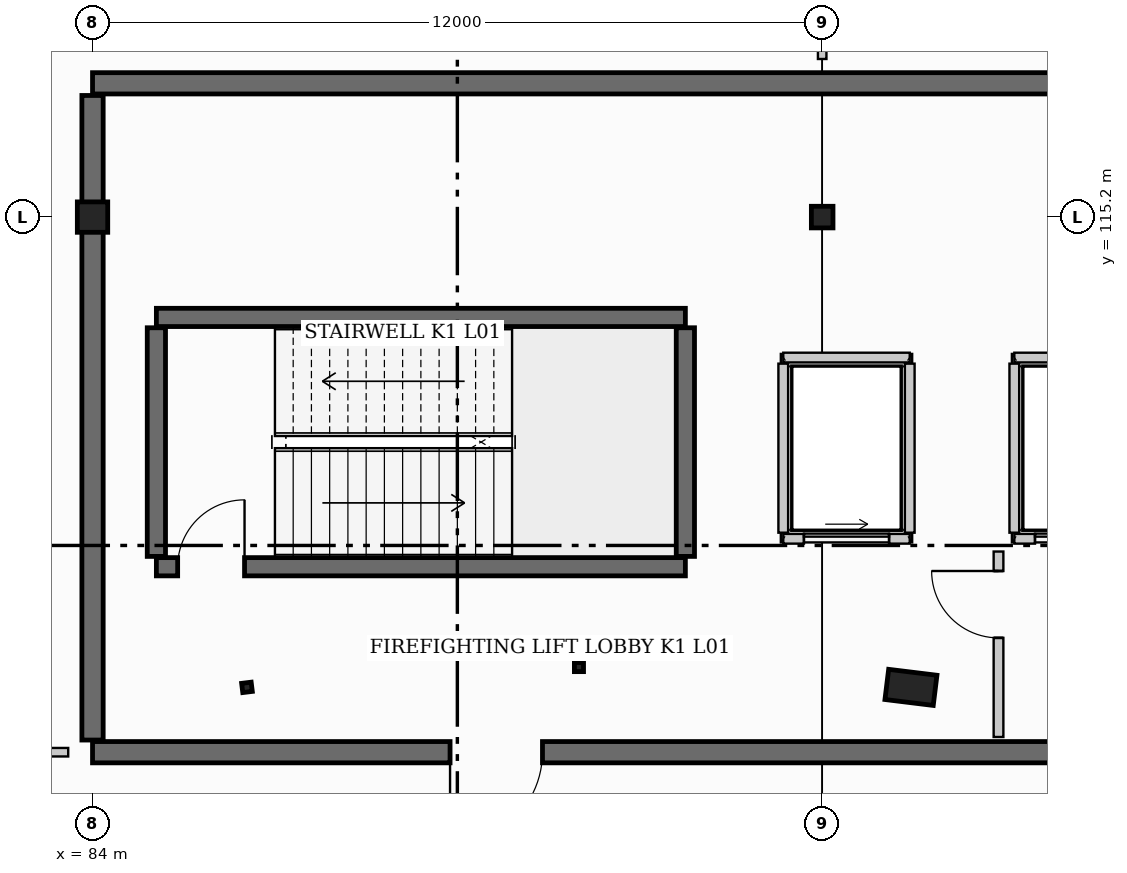
"""IFC4 building model, lengths in metres.
Left out: names, types, materials, properties, quantities, classifications, styles, units other than length and angle.
Written with IfcOpenShell. Run it as: python <this file> out.ifc"""

import sys

from ifc_helpers import new_model, si_unit, direction, frame, frame_2d, origin, origin_2d, place, context, subcontext, project, spatial, rectangle, hollow_rectangle, hollow_circle, i_section, extrude, element, fill, save


model = new_model("IFC4")
c1 = context("Model", 3, precision=1e-05, world=origin(), true_north=direction((0.0, 1.0)))
c2 = subcontext(c1, "Body", "Model", "MODEL_VIEW")
j1 = project(units=[si_unit("LENGTHUNIT", "METRE"), si_unit("PLANEANGLEUNIT", "RADIAN")], contexts=[c1])
p1 = place(None, origin())
s1 = spatial("IfcSite", under=j1, at=p1, CompositionType="ELEMENT")
p2 = place(p1, origin())
s2 = spatial("IfcBuilding", under=s1, at=p2, CompositionType="ELEMENT")
p3 = place(p2, frame((0.0, 0.0, 4.8)))
s3 = spatial("IfcBuildingStorey", under=s2, at=p3, CompositionType="ELEMENT", Elevation=4.8)
p4 = place(p3, frame((84.0, 115.2, 0.0), z_axis=(0.0, 0.0, 1.0), x_axis=(0.0, 1.0, 0.0)))
e1 = element("IfcColumn", 1, at=p4, inside=s3, PredefinedType="COLUMN", context=c2, shape_type="SweptSolid", body=[
    extrude(i_section(OverallWidth=0.5, OverallDepth=0.5, WebThickness=0.022, FlangeThickness=0.036, at=origin_2d()), origin(), (0.0, 0.0, 1.0), 4.8),
])
p5 = place(p3, frame((96.0, 115.2, 0.0), z_axis=(0.0, 0.0, 1.0), x_axis=(1.0, 0.0, 0.0)))
e2 = element("IfcColumn", 2, at=p5, inside=s3, PredefinedType="COLUMN", context=c2, shape_type="SweptSolid", body=[
    extrude(hollow_circle(Radius=0.178, WallThickness=0.013, at=origin_2d()), origin(), (0.0, 0.0, 1.0), 4.8),
])
p6 = place(p3, frame((86.54, 107.466, 0.0), z_axis=(0.0, 0.0, 1.0), x_axis=(-0.121869343405, 0.992546151641, 0.0)))
e3 = element("IfcColumn", 3, at=p6, inside=s3, PredefinedType="COLUMN", context=c2, shape_type="SweptSolid", body=[
    extrude(i_section(OverallWidth=0.153, OverallDepth=0.158, WebThickness=0.007, FlangeThickness=0.01, at=origin_2d()), origin(), (0.0, 0.0, 1.0), 4.8),
])
p7 = place(p3, frame((92.0, 107.8, 0.0), z_axis=(0.0, 0.0, 1.0), x_axis=(0.0, 1.0, 0.0)))
e4 = element("IfcColumn", 4, at=p7, inside=s3, PredefinedType="COLUMN", context=c2, shape_type="SweptSolid", body=[
    extrude(hollow_rectangle(XDim=0.15, YDim=0.15, WallThickness=0.008, at=origin_2d()), origin(), (0.0, 0.0, 1.0), 4.8),
])
p8 = place(p3, frame((97.46, 107.466, 0.0), z_axis=(0.0, 0.0, 1.0), x_axis=(0.121869343405, 0.992546151641, 0.0)))
e5 = element("IfcColumn", 5, at=p8, inside=s3, PredefinedType="PILASTER", context=c2, shape_type="SweptSolid", body=[
    extrude(rectangle(XDim=0.5, YDim=0.8, at=origin_2d()), origin(), (0.0, 0.0, 1.0), 4.8),
])
p9 = place(p3, frame((84.0, 117.4, 0.0), z_axis=(0.0, 0.0, 1.0), x_axis=(1.0, 0.0, 0.0)))
e6 = element("IfcWall", 6, at=p9, inside=s3, PredefinedType="SHEAR", context=c2, shape_type="SweptSolid", body=[
    extrude(rectangle(XDim=20.4, YDim=0.35, at=frame_2d((10.2, 0.0))), origin(), (0.0, 0.0, 1.0), 4.8),
])
p10 = place(p3, frame((104.4, 106.4, 0.0), z_axis=(0.0, 0.0, 1.0), x_axis=(-1.0, 0.0, 0.0)))
e7 = element("IfcWall", 7, at=p10, inside=s3, PredefinedType="SHEAR", context=c2, shape_type="SweptSolid", body=[
    extrude(rectangle(XDim=20.4, YDim=0.35, at=frame_2d((10.2, 0.0))), origin(), (0.0, 0.0, 1.0), 4.8),
])
p11 = place(p10, frame((2.2, 0.0, 0.0)))
e8 = element("IfcOpeningElement", 8, at=p11, cuts=e7, PredefinedType="OPENING", context=c2, shape_type="SweptSolid", body=[
    extrude(rectangle(XDim=1.64, YDim=2.2, at=frame_2d((0.82, 1.1))), frame((0.0, 0.185, 0.0), z_axis=(0.0, -1.0, 0.0), x_axis=(1.0, 0.0, 0.0)), (0.0, 0.0, 1.0), 0.37),
])
p12 = place(p10, frame((13.0, 0.0, 0.0)))
e9 = element("IfcOpeningElement", 9, at=p12, cuts=e7, PredefinedType="OPENING", context=c2, shape_type="SweptSolid", body=[
    extrude(rectangle(XDim=1.52, YDim=2.16, at=frame_2d((0.76, 1.08))), frame((0.0, 0.185, 0.0), z_axis=(0.0, -1.0, 0.0), x_axis=(1.0, 0.0, 0.0)), (0.0, 0.0, 1.0), 0.37),
])
p13 = place(p3, frame((84.0, 106.6, 0.0), z_axis=(0.0, 0.0, 1.0), x_axis=(0.0, 1.0, 0.0)))
e10 = element("IfcWall", 10, at=p13, inside=s3, PredefinedType="SHEAR", context=c2, shape_type="SweptSolid", body=[
    extrude(rectangle(XDim=10.6, YDim=0.35, at=frame_2d((5.3, 0.0))), origin(), (0.0, 0.0, 1.0), 4.8),
])
p14 = place(p3, frame((85.05, 109.45, 0.0), z_axis=(0.0, 0.0, 1.0), x_axis=(1.0, 0.0, 0.0)))
e11 = element("IfcWall", 11, at=p14, inside=s3, PredefinedType="SHEAR", context=c2, shape_type="SweptSolid", body=[
    extrude(rectangle(XDim=8.7, YDim=0.3, at=frame_2d((4.35, 0.0))), origin(), (0.0, 0.0, 1.0), 4.8),
])
p15 = place(p14, frame((0.35, 0.0, 0.0)))
e12 = element("IfcOpeningElement", 12, at=p15, cuts=e11, PredefinedType="OPENING", context=c2, shape_type="SweptSolid", body=[
    extrude(rectangle(XDim=1.1, YDim=2.15, at=frame_2d((0.55, 1.075))), frame((0.0, 0.16, 0.0), z_axis=(0.0, -1.0, 0.0), x_axis=(1.0, 0.0, 0.0)), (0.0, 0.0, 1.0), 0.32),
])
p16 = place(p3, frame((93.75, 113.55, 0.0), z_axis=(0.0, 0.0, 1.0), x_axis=(-1.0, 0.0, 0.0)))
e13 = element("IfcWall", 13, at=p16, inside=s3, PredefinedType="SHEAR", context=c2, shape_type="SweptSolid", body=[
    extrude(rectangle(XDim=8.7, YDim=0.3, at=frame_2d((4.35, 0.0))), origin(), (0.0, 0.0, 1.0), 4.8),
])
for number, where, z_axis, x_axis in (
    (14, (85.05, 109.62, 0.0), (0.0, 0.0, 1.0), (0.0, 1.0, 0.0)),
    (15, (93.75, 109.62, 0.0), (0.0, 0.0, 1.0), (0.0, 1.0, 0.0)),
):
    element("IfcWall", number, at=place(p3, frame(where, z_axis=z_axis, x_axis=x_axis)), inside=s3, PredefinedType="SHEAR", context=c2, shape_type="SweptSolid", body=[
        extrude(rectangle(XDim=3.76, YDim=0.3, at=frame_2d((1.88, 0.0))), origin(), (0.0, 0.0, 1.0), 4.8),
    ])
p17 = place(p3, frame((95.36, 109.91, 0.0), z_axis=(0.0, 0.0, 1.0), x_axis=(1.0, 0.0, 0.0)))
e16 = element("IfcWall", 16, at=p17, inside=s3, PredefinedType="PARTITIONING", context=c2, shape_type="SweptSolid", body=[
    extrude(rectangle(XDim=2.08, YDim=0.16, at=frame_2d((1.04, 0.0))), origin(), (0.0, 0.0, 1.0), 4.43),
])
p18 = place(p17, frame((0.34, 0.0, 0.0)))
e17 = element("IfcOpeningElement", 17, at=p18, cuts=e16, PredefinedType="OPENING", context=c2, shape_type="SweptSolid", body=[
    extrude(rectangle(XDim=1.4, YDim=2.2, at=frame_2d((0.7, 1.1))), frame((0.0, 0.09, 0.0), z_axis=(0.0, -1.0, 0.0), x_axis=(1.0, 0.0, 0.0)), (0.0, 0.0, 1.0), 0.18),
])
p19 = place(p3, frame((97.44, 112.89, 0.0), z_axis=(0.0, 0.0, 1.0), x_axis=(-1.0, 0.0, 0.0)))
e18 = element("IfcWall", 18, at=p19, inside=s3, PredefinedType="PARTITIONING", context=c2, shape_type="SweptSolid", body=[
    extrude(rectangle(XDim=2.08, YDim=0.16, at=frame_2d((1.04, 0.0))), origin(), (0.0, 0.0, 1.0), 4.43),
])
for number, where, z_axis, x_axis in (
    (19, (95.36, 112.79, 0.0), (0.0, 0.0, 1.0), (0.0, -1.0, 0.0)),
    (20, (97.44, 110.01, 0.0), (0.0, 0.0, 1.0), (0.0, 1.0, 0.0)),
):
    element("IfcWall", number, at=place(p3, frame(where, z_axis=z_axis, x_axis=x_axis)), inside=s3, PredefinedType="PARTITIONING", context=c2, shape_type="SweptSolid", body=[
        extrude(rectangle(XDim=2.78, YDim=0.16, at=frame_2d((1.39, 0.0))), origin(), (0.0, 0.0, 1.0), 4.43),
    ])
p20 = place(p3, frame((99.16, 109.91, 0.0), z_axis=(0.0, 0.0, 1.0), x_axis=(1.0, 0.0, 0.0)))
e21 = element("IfcWall", 21, at=p20, inside=s3, PredefinedType="PARTITIONING", context=c2, shape_type="SweptSolid", body=[
    extrude(rectangle(XDim=2.08, YDim=0.16, at=frame_2d((1.04, 0.0))), origin(), (0.0, 0.0, 1.0), 4.43),
])
p21 = place(p20, frame((0.34, 0.0, 0.0)))
e22 = element("IfcOpeningElement", 22, at=p21, cuts=e21, PredefinedType="OPENING", context=c2, shape_type="SweptSolid", body=[
    extrude(rectangle(XDim=1.4, YDim=2.2, at=frame_2d((0.7, 1.1))), frame((0.0, 0.09, 0.0), z_axis=(0.0, -1.0, 0.0), x_axis=(1.0, 0.0, 0.0)), (0.0, 0.0, 1.0), 0.18),
])
p22 = place(p3, frame((101.24, 112.89, 0.0), z_axis=(0.0, 0.0, 1.0), x_axis=(-1.0, 0.0, 0.0)))
e23 = element("IfcWall", 23, at=p22, inside=s3, PredefinedType="PARTITIONING", context=c2, shape_type="SweptSolid", body=[
    extrude(rectangle(XDim=2.08, YDim=0.16, at=frame_2d((1.04, 0.0))), origin(), (0.0, 0.0, 1.0), 4.43),
])
p23 = place(p3, frame((99.16, 112.79, 0.0), z_axis=(0.0, 0.0, 1.0), x_axis=(0.0, -1.0, 0.0)))
e24 = element("IfcWall", 24, at=p23, inside=s3, PredefinedType="PARTITIONING", context=c2, shape_type="SweptSolid", body=[
    extrude(rectangle(XDim=2.78, YDim=0.16, at=frame_2d((1.39, 0.0))), origin(), (0.0, 0.0, 1.0), 4.43),
])
p24 = place(p3, frame((98.9, 106.65, 0.0), z_axis=(0.0, 0.0, 1.0), x_axis=(0.0, 1.0, 0.0)))
e25 = element("IfcWall", 25, at=p24, inside=s3, PredefinedType="PARTITIONING", context=c2, shape_type="SweptSolid", body=[
    extrude(rectangle(XDim=3.05, YDim=0.16, at=frame_2d((1.525, 0.0))), origin(), (0.0, 0.0, 1.0), 4.43),
])
p25 = place(p24, frame((1.63, 0.0, 0.0)))
e26 = element("IfcOpeningElement", 26, at=p25, cuts=e25, PredefinedType="OPENING", context=c2, shape_type="SweptSolid", body=[
    extrude(rectangle(XDim=1.1, YDim=2.15, at=frame_2d((0.55, 1.075))), frame((0.0, 0.09, 0.0), z_axis=(0.0, -1.0, 0.0), x_axis=(1.0, 0.0, 0.0)), (0.0, 0.0, 1.0), 0.18),
])
p26 = place(p3, frame((71.25, 106.4, 0.0), z_axis=(0.0, 0.0, 1.0), x_axis=(1.0, 0.0, 0.0)))
e27 = element("IfcWall", 27, at=p26, inside=s3, PredefinedType="PARTITIONING", context=c2, shape_type="SweptSolid", body=[
    extrude(rectangle(XDim=12.35, YDim=0.14, at=frame_2d((6.175, 0.0))), origin(), (0.0, 0.0, 1.0), 4.43),
])
p27 = place(p26, frame((5.525, 0.0, 0.0)))
e28 = element("IfcOpeningElement", 28, at=p27, cuts=e27, PredefinedType="OPENING", context=c2, shape_type="SweptSolid", body=[
    extrude(rectangle(XDim=1.26, YDim=2.14, at=frame_2d((0.63, 1.07))), frame((0.0, 0.08, 0.0), z_axis=(0.0, -1.0, 0.0), x_axis=(1.0, 0.0, 0.0)), (0.0, 0.0, 1.0), 0.16),
])
p28 = place(p3, frame((96.0, 117.8, 0.0), z_axis=(0.0, 0.0, 1.0), x_axis=(0.0, 1.0, 0.0)))
e29 = element("IfcWall", 29, at=p28, inside=s3, PredefinedType="PARTITIONING", context=c2, shape_type="SweptSolid", body=[
    extrude(rectangle(XDim=7.9, YDim=0.14, at=frame_2d((3.95, 0.0))), origin(), (0.0, 0.0, 1.0), 3.97),
])
p29 = place(p18, origin())
e30 = element("IfcDoor", 30, at=p29, inside=s3, OperationType="SLIDING_TO_LEFT", PredefinedType="DOOR", context=c2, shape_type="SweptSolid", body=[
    extrude(rectangle(XDim=1.4, YDim=2.2, at=frame_2d((0.7, 1.1))), frame((0.0, 0.025, 0.0), z_axis=(0.0, -1.0, 0.0), x_axis=(1.0, 0.0, 0.0)), (0.0, 0.0, 1.0), 0.05),
])
fill(e17, e30)
p30 = place(p21, origin())
e31 = element("IfcDoor", 31, at=p30, inside=s3, OperationType="SLIDING_TO_LEFT", PredefinedType="DOOR", context=c2, shape_type="SweptSolid", body=[
    extrude(rectangle(XDim=1.4, YDim=2.2, at=frame_2d((0.7, 1.1))), frame((0.0, 0.025, 0.0), z_axis=(0.0, -1.0, 0.0), x_axis=(1.0, 0.0, 0.0)), (0.0, 0.0, 1.0), 0.05),
])
fill(e22, e31)
p31 = place(p15, origin())
e32 = element("IfcDoor", 32, at=p31, inside=s3, OperationType="SINGLE_SWING_RIGHT", PredefinedType="DOOR", context=c2, shape_type="SweptSolid", body=[
    extrude(rectangle(XDim=1.1, YDim=2.15, at=frame_2d((0.55, 1.075))), frame((0.0, 0.025, 0.0), z_axis=(0.0, -1.0, 0.0), x_axis=(1.0, 0.0, 0.0)), (0.0, 0.0, 1.0), 0.05),
])
fill(e12, e32)
p32 = place(p12, origin())
e33 = element("IfcDoor", 33, at=p32, inside=s3, OperationType="SINGLE_SWING_RIGHT", PredefinedType="DOOR", context=c2, shape_type="SweptSolid", body=[
    extrude(rectangle(XDim=1.52, YDim=2.16, at=frame_2d((0.76, 1.08))), frame((0.0, 0.025, 0.0), z_axis=(0.0, -1.0, 0.0), x_axis=(1.0, 0.0, 0.0)), (0.0, 0.0, 1.0), 0.05),
])
fill(e9, e33)
p33 = place(p25, origin())
e34 = element("IfcDoor", 34, at=p33, inside=s3, OperationType="SINGLE_SWING_RIGHT", PredefinedType="DOOR", context=c2, shape_type="SweptSolid", body=[
    extrude(rectangle(XDim=1.1, YDim=2.15, at=frame_2d((0.55, 1.075))), frame((0.0, 0.025, 0.0), z_axis=(0.0, -1.0, 0.0), x_axis=(1.0, 0.0, 0.0)), (0.0, 0.0, 1.0), 0.05),
])
fill(e26, e34)
save(model, sys.argv[1])
